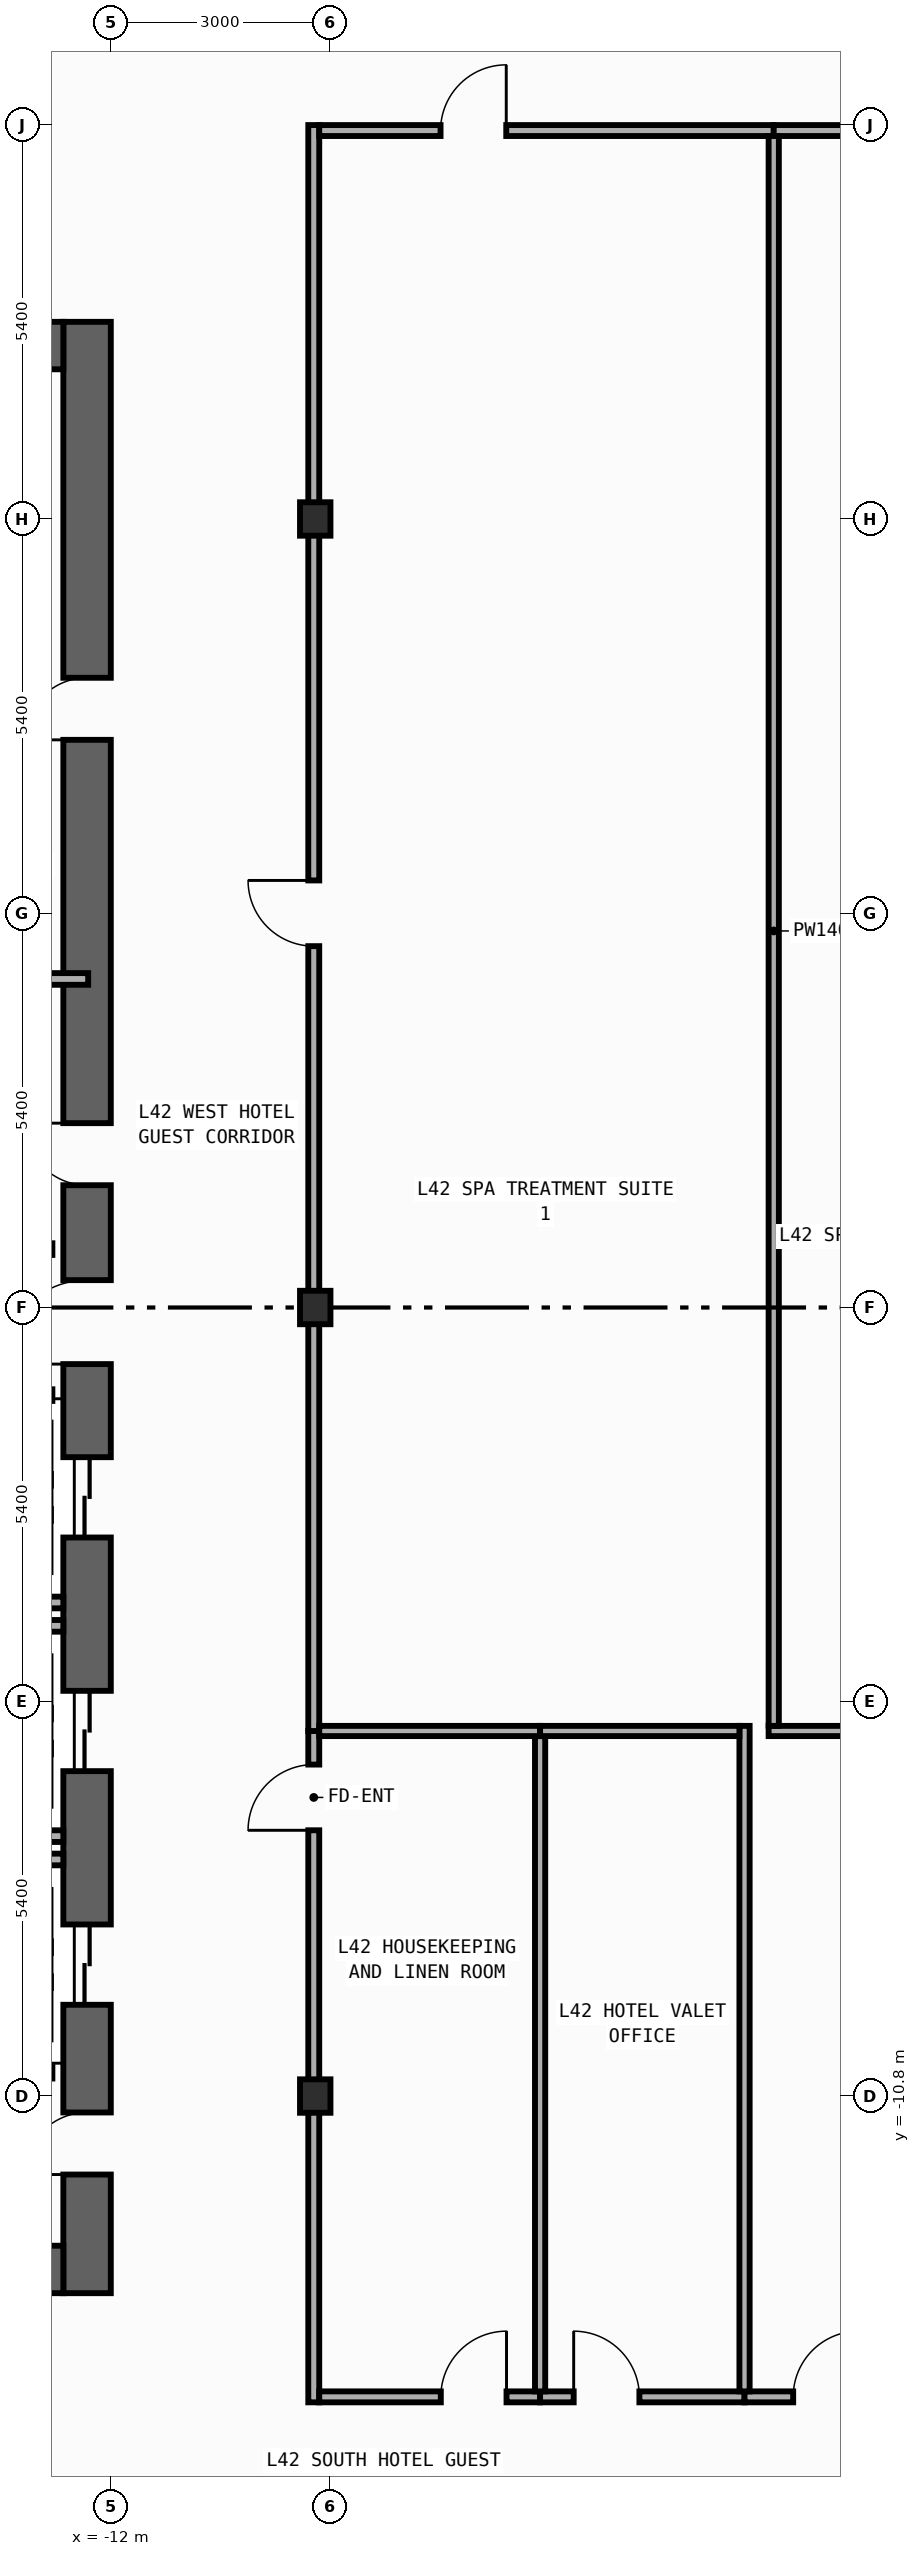
"""IFC4 building model, lengths in metres.
Left out: names, types, materials, properties, quantities, classifications, styles, units other than length and angle.
Written with IfcOpenShell. Run it as: python <this file> out.ifc"""

import sys

from ifc_helpers import new_model, si_unit, direction, frame, frame_2d, origin, origin_2d, place, context, subcontext, project, spatial, rectangle, i_section, extrude, element, fill, save


model = new_model("IFC4")
c1 = context("Model", 3, precision=1e-05, world=origin(), true_north=direction((0.0, 1.0)))
c2 = subcontext(c1, "Body", "Model", "MODEL_VIEW")
j1 = project(units=[si_unit("LENGTHUNIT", "METRE"), si_unit("PLANEANGLEUNIT", "RADIAN")], contexts=[c1])
p1 = place(None, origin())
s1 = spatial("IfcSite", under=j1, at=p1, CompositionType="ELEMENT")
p2 = place(p1, origin())
s2 = spatial("IfcBuilding", under=s1, at=p2, CompositionType="ELEMENT")
p3 = place(p2, frame((0.0, 0.0, 184.0)))
s3 = spatial("IfcBuildingStorey", under=s2, at=p3, CompositionType="ELEMENT", Elevation=184.0)
p4 = place(p3, frame((-12.325, -13.5, 0.0), z_axis=(0.0, 0.0, 1.0), x_axis=(0.0, 1.0, 0.0)))
e1 = element("IfcWall", 1, at=p4, inside=s3, PredefinedType="SHEAR", context=c2, shape_type="SweptSolid", body=[
    extrude(rectangle(XDim=27.0, YDim=0.65, at=frame_2d((13.5, 0.0))), origin(), (0.0, 0.0, 1.0), 3.54),
])
p5 = place(p4, frame((10.35, 0.0, 0.0)))
e2 = element("IfcOpeningElement", 2, at=p5, cuts=e1, PredefinedType="OPENING", context=c2, shape_type="SweptSolid", body=[
    extrude(rectangle(XDim=1.1, YDim=2.2, at=frame_2d((0.55, 1.1))), frame((0.0, 0.335, 0.0), z_axis=(0.0, -1.0, 0.0), x_axis=(1.0, 0.0, 0.0)), (0.0, 0.0, 1.0), 0.67),
])
p6 = place(p4, frame((7.15, 0.0, 0.0)))
e3 = element("IfcOpeningElement", 3, at=p6, cuts=e1, PredefinedType="OPENING", context=c2, shape_type="SweptSolid", body=[
    extrude(rectangle(XDim=1.1, YDim=2.2, at=frame_2d((0.55, 1.1))), frame((0.0, 0.335, 0.0), z_axis=(0.0, -1.0, 0.0), x_axis=(1.0, 0.0, 0.0)), (0.0, 0.0, 1.0), 0.67),
])
p7 = place(p4, frame((3.95, 0.0, 0.0)))
e4 = element("IfcOpeningElement", 4, at=p7, cuts=e1, PredefinedType="OPENING", context=c2, shape_type="SweptSolid", body=[
    extrude(rectangle(XDim=1.1, YDim=2.2, at=frame_2d((0.55, 1.1))), frame((0.0, 0.335, 0.0), z_axis=(0.0, -1.0, 0.0), x_axis=(1.0, 0.0, 0.0)), (0.0, 0.0, 1.0), 0.67),
])
p8 = place(p4, frame((15.175, 0.0, 0.0)))
e5 = element("IfcOpeningElement", 5, at=p8, cuts=e1, PredefinedType="OPENING", context=c2, shape_type="SweptSolid", body=[
    extrude(rectangle(XDim=0.85, YDim=2.1, at=frame_2d((0.425, 1.05))), frame((0.0, 0.335, 0.0), z_axis=(0.0, -1.0, 0.0), x_axis=(1.0, 0.0, 0.0)), (0.0, 0.0, 1.0), 0.67),
])
p9 = place(p4, frame((21.275, 0.0, 0.0)))
e6 = element("IfcOpeningElement", 6, at=p9, cuts=e1, PredefinedType="OPENING", context=c2, shape_type="SweptSolid", body=[
    extrude(rectangle(XDim=0.85, YDim=2.1, at=frame_2d((0.425, 1.05))), frame((0.0, 0.335, 0.0), z_axis=(0.0, -1.0, 0.0), x_axis=(1.0, 0.0, 0.0)), (0.0, 0.0, 1.0), 0.67),
])
p10 = place(p4, frame((12.725, 0.0, 0.0)))
e7 = element("IfcOpeningElement", 7, at=p10, cuts=e1, PredefinedType="OPENING", context=c2, shape_type="SweptSolid", body=[
    extrude(rectangle(XDim=1.15, YDim=2.2, at=frame_2d((0.575, 1.1))), frame((0.0, 0.335, 0.0), z_axis=(0.0, -1.0, 0.0), x_axis=(1.0, 0.0, 0.0)), (0.0, 0.0, 1.0), 0.67),
])
p11 = place(p4, frame((1.625, 0.0, 0.0)))
e8 = element("IfcOpeningElement", 8, at=p11, cuts=e1, PredefinedType="OPENING", context=c2, shape_type="SweptSolid", body=[
    extrude(rectangle(XDim=0.85, YDim=2.1, at=frame_2d((0.425, 1.05))), frame((0.0, 0.335, 0.0), z_axis=(0.0, -1.0, 0.0), x_axis=(1.0, 0.0, 0.0)), (0.0, 0.0, 1.0), 0.67),
])
for number, where, z_axis, x_axis in (
    (9, (-19.75, -13.175, 0.0), (0.0, 0.0, 1.0), (1.0, 0.0, 0.0)),
    (10, (-19.75, 13.175, 0.0), (0.0, 0.0, 1.0), (1.0, 0.0, 0.0)),
):
    element("IfcWall", number, at=place(p3, frame(where, z_axis=z_axis, x_axis=x_axis)), inside=s3, PredefinedType="SHEAR", context=c2, shape_type="SweptSolid", body=[
        extrude(rectangle(XDim=7.1, YDim=0.65, at=frame_2d((3.55, 0.0))), origin(), (0.0, 0.0, 1.0), 3.54),
    ])
for number, where, z_axis, x_axis in (
    (11, (-9.2, -10.8, 0.0), (0.0, 0.0, 1.0), (1.0, 0.0, 0.0)),
    (12, (-9.2, 0.0, 0.0), (0.0, 0.0, 1.0), (1.0, 0.0, 0.0)),
    (13, (-9.2, 10.8, 0.0), (0.0, 0.0, 1.0), (1.0, 0.0, 0.0)),
):
    element("IfcColumn", number, at=place(p3, frame(where, z_axis=z_axis, x_axis=x_axis)), inside=s3, PredefinedType="COLUMN", context=c2, shape_type="SweptSolid", body=[
        extrude(i_section(OverallWidth=0.417, OverallDepth=0.458, WebThickness=0.03, FlangeThickness=0.05, FilletRadius=0.022, at=origin_2d()), origin(), (0.0, 0.0, 1.0), 3.8),
    ])
for number, where, z_axis, x_axis in (
    (14, (-14.99, -4.04, 0.0), (0.0, 0.0, 1.0), (1.0, 0.0, 0.0)),
    (15, (-14.99, -7.24, 0.0), (0.0, 0.0, 1.0), (1.0, 0.0, 0.0)),
    (16, (-14.99, -4.36, 0.0), (0.0, 0.0, 1.0), (1.0, 0.0, 0.0)),
    (17, (-14.99, -7.56, 0.0), (0.0, 0.0, 1.0), (1.0, 0.0, 0.0)),
):
    element("IfcWall", number, at=place(p3, frame(where, z_axis=z_axis, x_axis=x_axis)), inside=s3, PredefinedType="STANDARD", context=c2, shape_type="SweptSolid", body=[
        extrude(rectangle(XDim=2.34, YDim=0.16, at=frame_2d((1.17, 0.0))), origin(), (0.0, 0.0, 1.0), 3.54),
    ])
p12 = place(p3, frame((-15.375, 4.5, 0.0), z_axis=(0.0, 0.0, 1.0), x_axis=(1.0, 0.0, 0.0)))
e18 = element("IfcWall", 18, at=p12, inside=s3, PredefinedType="PARTITIONING", context=c2, shape_type="SweptSolid", body=[
    extrude(rectangle(XDim=3.065, YDim=0.16, at=frame_2d((1.532, 0.0))), origin(), (0.0, 0.0, 1.0), 3.54),
])
p13 = place(p3, frame((-9.22, -14.995, 0.0), z_axis=(0.0, 0.0, 1.0), x_axis=(0.0, 1.0, 0.0)))
e19 = element("IfcWall", 19, at=p13, inside=s3, PredefinedType="PARTITIONING", context=c2, shape_type="SweptSolid", body=[
    extrude(rectangle(XDim=9.195, YDim=0.15, at=frame_2d((4.598, 0.0))), origin(), (0.0, 0.0, 1.0), 2.952),
])
p14 = place(p13, frame((7.835, 0.0, 0.0)))
e20 = element("IfcOpeningElement", 20, at=p14, cuts=e19, PredefinedType="OPENING", context=c2, shape_type="SweptSolid", body=[
    extrude(rectangle(XDim=0.9, YDim=2.15, at=frame_2d((0.45, 1.075))), frame((0.0, 0.085, 0.0), z_axis=(0.0, -1.0, 0.0), x_axis=(1.0, 0.0, 0.0)), (0.0, 0.0, 1.0), 0.17),
])
p15 = place(p3, frame((-9.22, -5.8, 0.0), z_axis=(0.0, 0.0, 1.0), x_axis=(0.0, 1.0, 0.0)))
e21 = element("IfcWall", 21, at=p15, inside=s3, PredefinedType="PARTITIONING", context=c2, shape_type="SweptSolid", body=[
    extrude(rectangle(XDim=21.995, YDim=0.15, at=frame_2d((10.998, 0.0))), origin(), (0.0, 0.0, 1.0), 2.952),
])
p16 = place(p15, frame((10.749, 0.0, 0.0)))
e22 = element("IfcOpeningElement", 22, at=p16, cuts=e21, PredefinedType="OPENING", context=c2, shape_type="SweptSolid", body=[
    extrude(rectangle(XDim=0.9, YDim=2.15, at=frame_2d((0.45, 1.075))), frame((0.0, 0.085, 0.0), z_axis=(0.0, -1.0, 0.0), x_axis=(1.0, 0.0, 0.0)), (0.0, 0.0, 1.0), 0.17),
])
p17 = place(p3, frame((-9.145, 16.12, 0.0), z_axis=(0.0, 0.0, 1.0), x_axis=(1.0, 0.0, 0.0)))
e23 = element("IfcWall", 23, at=p17, inside=s3, PredefinedType="PARTITIONING", context=c2, shape_type="SweptSolid", body=[
    extrude(rectangle(XDim=6.225, YDim=0.15, at=frame_2d((3.113, 0.0))), origin(), (0.0, 0.0, 1.0), 3.54),
])
p18 = place(p17, frame((1.661, 0.0, 0.0)))
e24 = element("IfcOpeningElement", 24, at=p18, cuts=e23, PredefinedType="OPENING", context=c2, shape_type="SweptSolid", body=[
    extrude(rectangle(XDim=0.9, YDim=2.15, at=frame_2d((0.45, 1.075))), frame((0.0, 0.085, 0.0), z_axis=(0.0, -1.0, 0.0), x_axis=(1.0, 0.0, 0.0)), (0.0, 0.0, 1.0), 0.17),
])
p19 = place(p3, frame((-2.92, 16.12, 0.0), z_axis=(0.0, 0.0, 1.0), x_axis=(1.0, 0.0, 0.0)))
e25 = element("IfcWall", 25, at=p19, inside=s3, PredefinedType="PARTITIONING", context=c2, shape_type="SweptSolid", body=[
    extrude(rectangle(XDim=6.0, YDim=0.15, at=frame_2d((3.0, 0.0))), origin(), (0.0, 0.0, 1.0), 3.54),
])
p20 = place(p19, frame((4.64, 0.0, 0.0)))
e26 = element("IfcOpeningElement", 26, at=p20, cuts=e25, PredefinedType="OPENING", context=c2, shape_type="SweptSolid", body=[
    extrude(rectangle(XDim=0.9, YDim=2.15, at=frame_2d((0.45, 1.075))), frame((0.0, 0.085, 0.0), z_axis=(0.0, -1.0, 0.0), x_axis=(1.0, 0.0, 0.0)), (0.0, 0.0, 1.0), 0.17),
])
p21 = place(p3, frame((-9.145, -14.92, 0.0), z_axis=(0.0, 0.0, 1.0), x_axis=(1.0, 0.0, 0.0)))
e27 = element("IfcWall", 27, at=p21, inside=s3, PredefinedType="PARTITIONING", context=c2, shape_type="SweptSolid", body=[
    extrude(rectangle(XDim=3.025, YDim=0.15, at=frame_2d((1.512, 0.0))), origin(), (0.0, 0.0, 1.0), 3.54),
])
p22 = place(p21, frame((1.665, 0.0, 0.0)))
e28 = element("IfcOpeningElement", 28, at=p22, cuts=e27, PredefinedType="OPENING", context=c2, shape_type="SweptSolid", body=[
    extrude(rectangle(XDim=0.9, YDim=2.15, at=frame_2d((0.45, 1.075))), frame((0.0, 0.085, 0.0), z_axis=(0.0, -1.0, 0.0), x_axis=(1.0, 0.0, 0.0)), (0.0, 0.0, 1.0), 0.17),
])
p23 = place(p3, frame((-6.12, -14.92, 0.0), z_axis=(0.0, 0.0, 1.0), x_axis=(1.0, 0.0, 0.0)))
e29 = element("IfcWall", 29, at=p23, inside=s3, PredefinedType="PARTITIONING", context=c2, shape_type="SweptSolid", body=[
    extrude(rectangle(XDim=2.8, YDim=0.15, at=frame_2d((1.4, 0.0))), origin(), (0.0, 0.0, 1.0), 3.54),
])
p24 = place(p23, frame((0.46, 0.0, 0.0)))
e30 = element("IfcOpeningElement", 30, at=p24, cuts=e29, PredefinedType="OPENING", context=c2, shape_type="SweptSolid", body=[
    extrude(rectangle(XDim=0.9, YDim=2.15, at=frame_2d((0.45, 1.075))), frame((0.0, 0.085, 0.0), z_axis=(0.0, -1.0, 0.0), x_axis=(1.0, 0.0, 0.0)), (0.0, 0.0, 1.0), 0.17),
])
p25 = place(p3, frame((-3.32, -14.92, 0.0), z_axis=(0.0, 0.0, 1.0), x_axis=(1.0, 0.0, 0.0)))
e31 = element("IfcWall", 31, at=p25, inside=s3, PredefinedType="PARTITIONING", context=c2, shape_type="SweptSolid", body=[
    extrude(rectangle(XDim=7.6, YDim=0.15, at=frame_2d((3.8, 0.0))), origin(), (0.0, 0.0, 1.0), 3.54),
])
p26 = place(p25, frame((0.667, 0.0, 0.0)))
e32 = element("IfcOpeningElement", 32, at=p26, cuts=e31, PredefinedType="OPENING", context=c2, shape_type="SweptSolid", body=[
    extrude(rectangle(XDim=0.9, YDim=2.15, at=frame_2d((0.45, 1.075))), frame((0.0, 0.085, 0.0), z_axis=(0.0, -1.0, 0.0), x_axis=(1.0, 0.0, 0.0)), (0.0, 0.0, 1.0), 0.17),
])
p27 = place(p3, frame((-6.12, -14.845, 0.0), z_axis=(0.0, 0.0, 1.0), x_axis=(0.0, 1.0, 0.0)))
e33 = element("IfcWall", 33, at=p27, inside=s3, PredefinedType="PARTITIONING", context=c2, shape_type="SweptSolid", body=[
    extrude(rectangle(XDim=8.975, YDim=0.14, at=frame_2d((4.487, 0.0))), origin(), (0.0, 0.0, 1.0), 3.54),
])
p28 = place(p3, frame((-9.145, -5.8, 0.0), z_axis=(0.0, 0.0, 1.0), x_axis=(1.0, 0.0, 0.0)))
e34 = element("IfcWall", 34, at=p28, inside=s3, PredefinedType="PARTITIONING", context=c2, shape_type="SweptSolid", body=[
    extrude(rectangle(XDim=3.025, YDim=0.14, at=frame_2d((1.512, 0.0))), origin(), (0.0, 0.0, 1.0), 3.54),
])
p29 = place(p3, frame((-3.32, -14.845, 0.0), z_axis=(0.0, 0.0, 1.0), x_axis=(0.0, 1.0, 0.0)))
e35 = element("IfcWall", 35, at=p29, inside=s3, PredefinedType="PARTITIONING", context=c2, shape_type="SweptSolid", body=[
    extrude(rectangle(XDim=9.115, YDim=0.14, at=frame_2d((4.558, 0.0))), origin(), (0.0, 0.0, 1.0), 3.54),
])
p30 = place(p3, frame((-6.12, -5.8, 0.0), z_axis=(0.0, 0.0, 1.0), x_axis=(1.0, 0.0, 0.0)))
e36 = element("IfcWall", 36, at=p30, inside=s3, PredefinedType="PARTITIONING", context=c2, shape_type="SweptSolid", body=[
    extrude(rectangle(XDim=2.73, YDim=0.14, at=frame_2d((1.365, 0.0))), origin(), (0.0, 0.0, 1.0), 3.54),
])
p31 = place(p3, frame((-2.99, -5.8, 0.0), z_axis=(0.0, 0.0, 1.0), x_axis=(1.0, 0.0, 0.0)))
e37 = element("IfcWall", 37, at=p31, inside=s3, PredefinedType="PARTITIONING", context=c2, shape_type="SweptSolid", body=[
    extrude(rectangle(XDim=6.07, YDim=0.14, at=frame_2d((3.035, 0.0))), origin(), (0.0, 0.0, 1.0), 3.54),
])
p32 = place(p3, frame((-2.92, -5.73, 0.0), z_axis=(0.0, 0.0, 1.0), x_axis=(0.0, 1.0, 0.0)))
e38 = element("IfcWall", 38, at=p32, inside=s3, PredefinedType="PARTITIONING", context=c2, shape_type="SweptSolid", body=[
    extrude(rectangle(XDim=21.775, YDim=0.14, at=frame_2d((10.887, 0.0))), origin(), (0.0, 0.0, 1.0), 3.54),
])
p33 = place(p5, origin())
e39 = element("IfcDoor", 39, at=p33, inside=s3, OperationType="DOUBLE_DOOR_SLIDING", PredefinedType="DOOR", context=c2, shape_type="SweptSolid", body=[
    extrude(rectangle(XDim=1.1, YDim=2.2, at=frame_2d((0.55, 1.1))), frame((0.0, 0.025, 0.0), z_axis=(0.0, -1.0, 0.0), x_axis=(1.0, 0.0, 0.0)), (0.0, 0.0, 1.0), 0.05),
])
fill(e2, e39)
p34 = place(p6, origin())
e40 = element("IfcDoor", 40, at=p34, inside=s3, OperationType="DOUBLE_DOOR_SLIDING", PredefinedType="DOOR", context=c2, shape_type="SweptSolid", body=[
    extrude(rectangle(XDim=1.1, YDim=2.2, at=frame_2d((0.55, 1.1))), frame((0.0, 0.025, 0.0), z_axis=(0.0, -1.0, 0.0), x_axis=(1.0, 0.0, 0.0)), (0.0, 0.0, 1.0), 0.05),
])
fill(e3, e40)
p35 = place(p7, origin())
e41 = element("IfcDoor", 41, at=p35, inside=s3, OperationType="DOUBLE_DOOR_SLIDING", PredefinedType="DOOR", context=c2, shape_type="SweptSolid", body=[
    extrude(rectangle(XDim=1.1, YDim=2.2, at=frame_2d((0.55, 1.1))), frame((0.0, 0.025, 0.0), z_axis=(0.0, -1.0, 0.0), x_axis=(1.0, 0.0, 0.0)), (0.0, 0.0, 1.0), 0.05),
])
fill(e4, e41)
p36 = place(p8, origin())
e42 = element("IfcDoor", 42, at=p36, inside=s3, OperationType="SINGLE_SWING_RIGHT", PredefinedType="DOOR", context=c2, shape_type="SweptSolid", body=[
    extrude(rectangle(XDim=0.85, YDim=2.1, at=frame_2d((0.425, 1.05))), frame((0.0, 0.025, 0.0), z_axis=(0.0, -1.0, 0.0), x_axis=(1.0, 0.0, 0.0)), (0.0, 0.0, 1.0), 0.05),
])
fill(e5, e42)
p37 = place(p9, origin())
e43 = element("IfcDoor", 43, at=p37, inside=s3, OperationType="SINGLE_SWING_LEFT", PredefinedType="DOOR", context=c2, shape_type="SweptSolid", body=[
    extrude(rectangle(XDim=0.85, YDim=2.1, at=frame_2d((0.425, 1.05))), frame((0.0, 0.025, 0.0), z_axis=(0.0, -1.0, 0.0), x_axis=(1.0, 0.0, 0.0)), (0.0, 0.0, 1.0), 0.05),
])
fill(e6, e43)
p38 = place(p10, origin())
e44 = element("IfcDoor", 44, at=p38, inside=s3, OperationType="SINGLE_SWING_LEFT", PredefinedType="DOOR", context=c2, shape_type="SweptSolid", body=[
    extrude(rectangle(XDim=1.15, YDim=2.2, at=frame_2d((0.575, 1.1))), frame((0.0, 0.025, 0.0), z_axis=(0.0, -1.0, 0.0), x_axis=(1.0, 0.0, 0.0)), (0.0, 0.0, 1.0), 0.05),
])
fill(e7, e44)
p39 = place(p11, origin())
e45 = element("IfcDoor", 45, at=p39, inside=s3, OperationType="SINGLE_SWING_LEFT", PredefinedType="DOOR", context=c2, shape_type="SweptSolid", body=[
    extrude(rectangle(XDim=0.85, YDim=2.1, at=frame_2d((0.425, 1.05))), frame((0.0, 0.025, 0.0), z_axis=(0.0, -1.0, 0.0), x_axis=(1.0, 0.0, 0.0)), (0.0, 0.0, 1.0), 0.05),
])
fill(e8, e45)
p40 = place(p14, origin())
e46 = element("IfcDoor", 46, at=p40, inside=s3, OperationType="SINGLE_SWING_LEFT", PredefinedType="DOOR", context=c2, shape_type="SweptSolid", body=[
    extrude(rectangle(XDim=0.9, YDim=2.15, at=frame_2d((0.45, 1.075))), frame((0.0, 0.025, 0.0), z_axis=(0.0, -1.0, 0.0), x_axis=(1.0, 0.0, 0.0)), (0.0, 0.0, 1.0), 0.05),
])
fill(e20, e46)
p41 = place(p16, origin())
e47 = element("IfcDoor", 47, at=p41, inside=s3, OperationType="SINGLE_SWING_RIGHT", PredefinedType="DOOR", context=c2, shape_type="SweptSolid", body=[
    extrude(rectangle(XDim=0.9, YDim=2.15, at=frame_2d((0.45, 1.075))), frame((0.0, 0.025, 0.0), z_axis=(0.0, -1.0, 0.0), x_axis=(1.0, 0.0, 0.0)), (0.0, 0.0, 1.0), 0.05),
])
fill(e22, e47)
p42 = place(p18, origin())
e48 = element("IfcDoor", 48, at=p42, inside=s3, OperationType="SINGLE_SWING_RIGHT", PredefinedType="DOOR", context=c2, shape_type="SweptSolid", body=[
    extrude(rectangle(XDim=0.9, YDim=2.15, at=frame_2d((0.45, 1.075))), frame((0.0, 0.025, 0.0), z_axis=(0.0, -1.0, 0.0), x_axis=(1.0, 0.0, 0.0)), (0.0, 0.0, 1.0), 0.05),
])
fill(e24, e48)
p43 = place(p22, origin())
e49 = element("IfcDoor", 49, at=p43, inside=s3, OperationType="SINGLE_SWING_RIGHT", PredefinedType="DOOR", context=c2, shape_type="SweptSolid", body=[
    extrude(rectangle(XDim=0.9, YDim=2.15, at=frame_2d((0.45, 1.075))), frame((0.0, 0.025, 0.0), z_axis=(0.0, -1.0, 0.0), x_axis=(1.0, 0.0, 0.0)), (0.0, 0.0, 1.0), 0.05),
])
fill(e28, e49)
p44 = place(p24, origin())
e50 = element("IfcDoor", 50, at=p44, inside=s3, OperationType="SINGLE_SWING_LEFT", PredefinedType="DOOR", context=c2, shape_type="SweptSolid", body=[
    extrude(rectangle(XDim=0.9, YDim=2.15, at=frame_2d((0.45, 1.075))), frame((0.0, 0.025, 0.0), z_axis=(0.0, -1.0, 0.0), x_axis=(1.0, 0.0, 0.0)), (0.0, 0.0, 1.0), 0.05),
])
fill(e30, e50)
p45 = place(p26, origin())
e51 = element("IfcDoor", 51, at=p45, inside=s3, OperationType="SINGLE_SWING_RIGHT", PredefinedType="DOOR", context=c2, shape_type="SweptSolid", body=[
    extrude(rectangle(XDim=0.9, YDim=2.15, at=frame_2d((0.45, 1.075))), frame((0.0, 0.025, 0.0), z_axis=(0.0, -1.0, 0.0), x_axis=(1.0, 0.0, 0.0)), (0.0, 0.0, 1.0), 0.05),
])
fill(e32, e51)
save(model, sys.argv[1])
